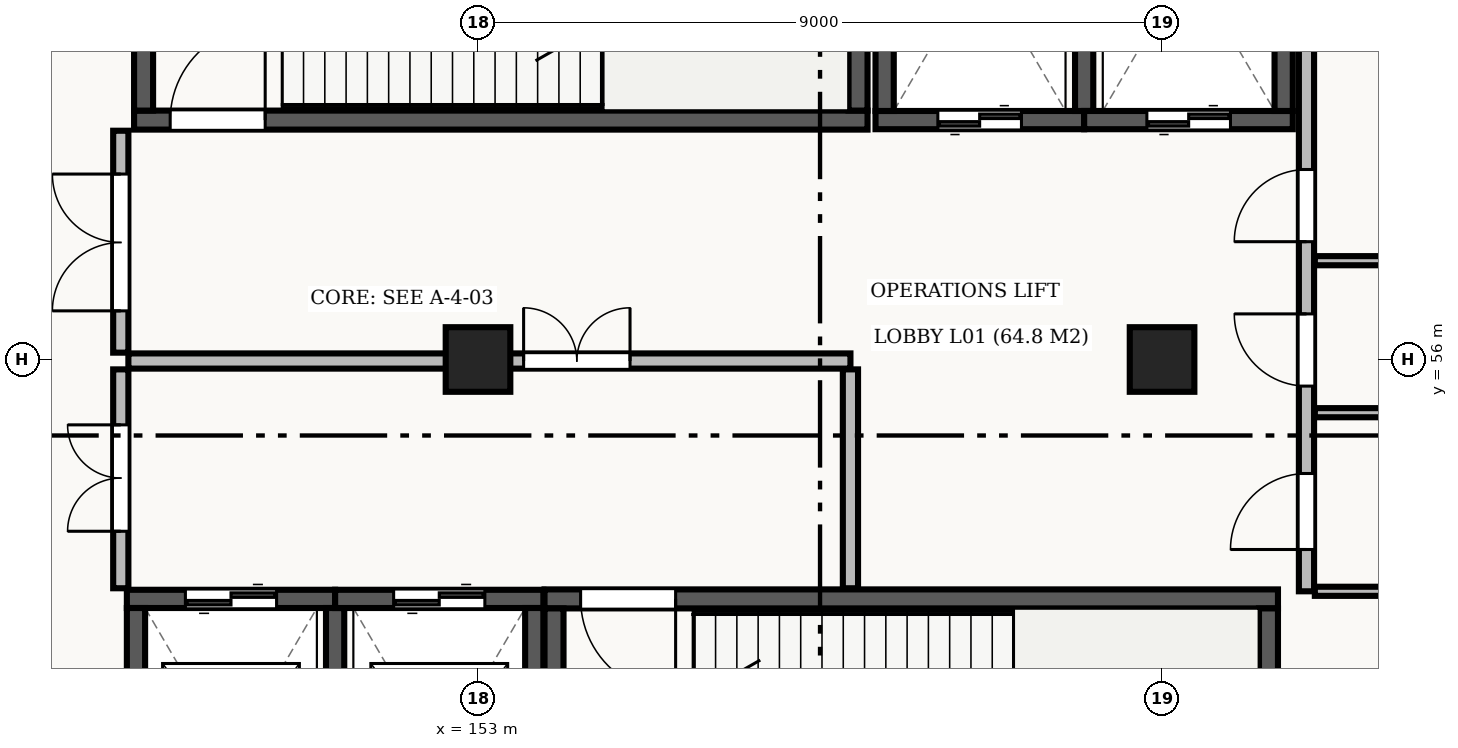
"""IFC4 building model, lengths in metres.
Left out: names, types, materials, properties, quantities, classifications, styles, units other than length and angle.
Written with IfcOpenShell. Run it as: python <this file> out.ifc"""

import sys

from ifc_helpers import new_model, si_unit, direction, frame, frame_2d, origin, origin_2d, place, context, subcontext, project, spatial, rectangle, extrude, element, fill, save


model = new_model("IFC4")
c1 = context("Model", 3, precision=1e-05, world=origin(), true_north=direction((0.0, 1.0)))
c2 = subcontext(c1, "Body", "Model", "MODEL_VIEW")
j1 = project(units=[si_unit("LENGTHUNIT", "METRE"), si_unit("PLANEANGLEUNIT", "RADIAN")], contexts=[c1])
p1 = place(None, origin())
s1 = spatial("IfcSite", under=j1, at=p1, CompositionType="ELEMENT")
p2 = place(p1, origin())
s2 = spatial("IfcBuilding", under=s1, at=p2, CompositionType="ELEMENT")
p3 = place(p2, frame((0.0, 0.0, 5.4)))
s3 = spatial("IfcBuildingStorey", under=s2, at=p3, CompositionType="ELEMENT", Elevation=5.4)
for number, where, z_axis, x_axis in (
    (1, (153.0, 56.0, 0.0), (0.0, 0.0, 1.0), (1.0, 0.0, 0.0)),
    (2, (162.0, 56.0, 0.0), (0.0, 0.0, 1.0), (1.0, 0.0, 0.0)),
):
    element("IfcColumn", number, at=place(p3, frame(where, z_axis=z_axis, x_axis=x_axis)), inside=s3, PredefinedType="COLUMN", context=c2, shape_type="SweptSolid", body=[
        extrude(rectangle(XDim=0.85, YDim=0.85, at=origin_2d()), origin(), (0.0, 0.0, 1.0), 4.8),
    ])
p4 = place(p3, frame((148.475, 59.15, 0.0), z_axis=(0.0, 0.0, 1.0), x_axis=(1.0, 0.0, 0.0)))
e3 = element("IfcWall", 3, at=p4, inside=s3, PredefinedType="SHEAR", context=c2, shape_type="SweptSolid", body=[
    extrude(rectangle(XDim=9.65, YDim=0.25, at=frame_2d((4.825, 0.0))), origin(), (0.0, 0.0, 1.0), 4.48),
])
p5 = place(p4, frame((0.475, 0.0, 0.0)))
e4 = element("IfcOpeningElement", 4, at=p5, cuts=e3, PredefinedType="OPENING", context=c2, shape_type="SweptSolid", body=[
    extrude(rectangle(XDim=1.25, YDim=2.15, at=frame_2d((0.625, 1.075))), frame((0.0, 0.137, 0.0), z_axis=(0.0, -1.0, 0.0), x_axis=(1.0, 0.0, 0.0)), (0.0, 0.0, 1.0), 0.274),
])
for number, where, z_axis, x_axis in (
    (5, (148.6, 63.125, 0.0), (0.0, 0.0, 1.0), (0.0, -1.0, 0.0)),
    (6, (158.0, 59.275, 0.0), (0.0, 0.0, 1.0), (0.0, 1.0, 0.0)),
):
    element("IfcWall", number, at=place(p3, frame(where, z_axis=z_axis, x_axis=x_axis)), inside=s3, PredefinedType="SHEAR", context=c2, shape_type="SweptSolid", body=[
        extrude(rectangle(XDim=3.85, YDim=0.25, at=frame_2d((1.925, 0.0))), origin(), (0.0, 0.0, 1.0), 4.48),
    ])
p6 = place(p3, frame((163.525, 52.85, 0.0), z_axis=(0.0, 0.0, 1.0), x_axis=(-1.0, 0.0, 0.0)))
e7 = element("IfcWall", 7, at=p6, inside=s3, PredefinedType="SHEAR", context=c2, shape_type="SweptSolid", body=[
    extrude(rectangle(XDim=9.65, YDim=0.25, at=frame_2d((4.825, 0.0))), origin(), (0.0, 0.0, 1.0), 4.48),
])
p7 = place(p6, frame((7.925, 0.0, 0.0)))
e8 = element("IfcOpeningElement", 8, at=p7, cuts=e7, PredefinedType="OPENING", context=c2, shape_type="SweptSolid", body=[
    extrude(rectangle(XDim=1.25, YDim=2.15, at=frame_2d((0.625, 1.075))), frame((0.0, 0.137, 0.0), z_axis=(0.0, -1.0, 0.0), x_axis=(1.0, 0.0, 0.0)), (0.0, 0.0, 1.0), 0.274),
])
for number, where, z_axis, x_axis in (
    (9, (154.0, 52.725, 0.0), (0.0, 0.0, 1.0), (0.0, -1.0, 0.0)),
    (10, (163.4, 48.875, 0.0), (0.0, 0.0, 1.0), (0.0, 1.0, 0.0)),
):
    element("IfcWall", number, at=place(p3, frame(where, z_axis=z_axis, x_axis=x_axis)), inside=s3, PredefinedType="SHEAR", context=c2, shape_type="SweptSolid", body=[
        extrude(rectangle(XDim=3.85, YDim=0.25, at=frame_2d((1.925, 0.0))), origin(), (0.0, 0.0, 1.0), 4.48),
    ])
p8 = place(p3, frame((158.23, 59.15, 0.0), z_axis=(0.0, 0.0, 1.0), x_axis=(1.0, 0.0, 0.0)))
e11 = element("IfcWall", 11, at=p8, inside=s3, PredefinedType="SHEAR", context=c2, shape_type="SweptSolid", body=[
    extrude(rectangle(XDim=2.745, YDim=0.24, at=frame_2d((1.373, 0.0))), origin(), (0.0, 0.0, 1.0), 4.48),
])
p9 = place(p8, frame((0.82, 0.0, 0.0)))
e12 = element("IfcOpeningElement", 12, at=p9, cuts=e11, PredefinedType="OPENING", context=c2, shape_type="SweptSolid", body=[
    extrude(rectangle(XDim=1.1, YDim=2.2, at=frame_2d((0.55, 1.1))), frame((0.0, 0.132, 0.0), z_axis=(0.0, -1.0, 0.0), x_axis=(1.0, 0.0, 0.0)), (0.0, 0.0, 1.0), 0.264),
])
for number, where, z_axis, x_axis in (
    (13, (158.35, 63.13, 0.0), (0.0, 0.0, 1.0), (0.0, -1.0, 0.0)),
    (14, (160.975, 59.27, 0.0), (0.0, 0.0, 1.0), (0.0, 1.0, 0.0)),
):
    element("IfcWall", number, at=place(p3, frame(where, z_axis=z_axis, x_axis=x_axis)), inside=s3, PredefinedType="SHEAR", context=c2, shape_type="SweptSolid", body=[
        extrude(rectangle(XDim=3.86, YDim=0.24, at=frame_2d((1.93, 0.0))), origin(), (0.0, 0.0, 1.0), 4.48),
    ])
p10 = place(p3, frame((160.975, 59.15, 0.0), z_axis=(0.0, 0.0, 1.0), x_axis=(1.0, 0.0, 0.0)))
e15 = element("IfcWall", 15, at=p10, inside=s3, PredefinedType="SHEAR", context=c2, shape_type="SweptSolid", body=[
    extrude(rectangle(XDim=2.745, YDim=0.24, at=frame_2d((1.373, 0.0))), origin(), (0.0, 0.0, 1.0), 4.48),
])
p11 = place(p10, frame((0.825, 0.0, 0.0)))
e16 = element("IfcOpeningElement", 16, at=p11, cuts=e15, PredefinedType="OPENING", context=c2, shape_type="SweptSolid", body=[
    extrude(rectangle(XDim=1.1, YDim=2.2, at=frame_2d((0.55, 1.1))), frame((0.0, 0.132, 0.0), z_axis=(0.0, -1.0, 0.0), x_axis=(1.0, 0.0, 0.0)), (0.0, 0.0, 1.0), 0.264),
])
p12 = place(p3, frame((163.6, 59.27, 0.0), z_axis=(0.0, 0.0, 1.0), x_axis=(0.0, 1.0, 0.0)))
e17 = element("IfcWall", 17, at=p12, inside=s3, PredefinedType="SHEAR", context=c2, shape_type="SweptSolid", body=[
    extrude(rectangle(XDim=3.86, YDim=0.24, at=frame_2d((1.93, 0.0))), origin(), (0.0, 0.0, 1.0), 4.48),
])
p13 = place(p3, frame((151.12, 52.85, 0.0), z_axis=(0.0, 0.0, 1.0), x_axis=(-1.0, 0.0, 0.0)))
e18 = element("IfcWall", 18, at=p13, inside=s3, PredefinedType="SHEAR", context=c2, shape_type="SweptSolid", body=[
    extrude(rectangle(XDim=2.74, YDim=0.24, at=frame_2d((1.37, 0.0))), origin(), (0.0, 0.0, 1.0), 4.48),
])
p14 = place(p13, frame((0.77, 0.0, 0.0)))
e19 = element("IfcOpeningElement", 19, at=p14, cuts=e18, PredefinedType="OPENING", context=c2, shape_type="SweptSolid", body=[
    extrude(rectangle(XDim=1.2, YDim=2.2, at=frame_2d((0.6, 1.1))), frame((0.0, 0.132, 0.0), z_axis=(0.0, -1.0, 0.0), x_axis=(1.0, 0.0, 0.0)), (0.0, 0.0, 1.0), 0.264),
])
for number, where, z_axis, x_axis in (
    (20, (148.5, 52.73, 0.0), (0.0, 0.0, 1.0), (0.0, -1.0, 0.0)),
    (21, (151.12, 48.87, 0.0), (0.0, 0.0, 1.0), (0.0, 1.0, 0.0)),
):
    element("IfcWall", number, at=place(p3, frame(where, z_axis=z_axis, x_axis=x_axis)), inside=s3, PredefinedType="SHEAR", context=c2, shape_type="SweptSolid", body=[
        extrude(rectangle(XDim=3.86, YDim=0.24, at=frame_2d((1.93, 0.0))), origin(), (0.0, 0.0, 1.0), 4.48),
    ])
p15 = place(p3, frame((153.86, 52.85, 0.0), z_axis=(0.0, 0.0, 1.0), x_axis=(-1.0, 0.0, 0.0)))
e22 = element("IfcWall", 22, at=p15, inside=s3, PredefinedType="SHEAR", context=c2, shape_type="SweptSolid", body=[
    extrude(rectangle(XDim=2.74, YDim=0.24, at=frame_2d((1.37, 0.0))), origin(), (0.0, 0.0, 1.0), 4.48),
])
p16 = place(p15, frame((0.77, 0.0, 0.0)))
e23 = element("IfcOpeningElement", 23, at=p16, cuts=e22, PredefinedType="OPENING", context=c2, shape_type="SweptSolid", body=[
    extrude(rectangle(XDim=1.2, YDim=2.2, at=frame_2d((0.6, 1.1))), frame((0.0, 0.132, 0.0), z_axis=(0.0, -1.0, 0.0), x_axis=(1.0, 0.0, 0.0)), (0.0, 0.0, 1.0), 0.264),
])
p17 = place(p3, frame((153.74, 48.87, 0.0), z_axis=(0.0, 0.0, 1.0), x_axis=(0.0, 1.0, 0.0)))
e24 = element("IfcWall", 24, at=p17, inside=s3, PredefinedType="SHEAR", context=c2, shape_type="SweptSolid", body=[
    extrude(rectangle(XDim=3.86, YDim=0.24, at=frame_2d((1.93, 0.0))), origin(), (0.0, 0.0, 1.0), 4.48),
])
p18 = place(p3, frame((148.4, 55.98, 0.0), z_axis=(0.0, 0.0, 1.0), x_axis=(1.0, 0.0, 0.0)))
e25 = element("IfcWall", 25, at=p18, inside=s3, PredefinedType="STANDARD", context=c2, shape_type="SweptSolid", body=[
    extrude(rectangle(XDim=9.5, YDim=0.2, at=frame_2d((4.75, 0.0))), origin(), (0.0, 0.0, 1.0), 3.76),
])
p19 = place(p18, frame((5.2, 0.0, 0.0)))
e26 = element("IfcOpeningElement", 26, at=p19, cuts=e25, PredefinedType="OPENING", context=c2, shape_type="SweptSolid", body=[
    extrude(rectangle(XDim=1.4, YDim=2.2, at=frame_2d((0.7, 1.1))), frame((0.0, 0.112, 0.0), z_axis=(0.0, -1.0, 0.0), x_axis=(1.0, 0.0, 0.0)), (0.0, 0.0, 1.0), 0.224),
])
p20 = place(p3, frame((157.9, 52.99, 0.0), z_axis=(0.0, 0.0, 1.0), x_axis=(0.0, 1.0, 0.0)))
e27 = element("IfcWall", 27, at=p20, inside=s3, PredefinedType="STANDARD", context=c2, shape_type="SweptSolid", body=[
    extrude(rectangle(XDim=2.88, YDim=0.2, at=frame_2d((1.44, 0.0))), origin(), (0.0, 0.0, 1.0), 4.48),
])
p21 = place(p3, frame((148.3, 52.99, 0.0), z_axis=(0.0, 0.0, 1.0), x_axis=(0.0, 1.0, 0.0)))
e28 = element("IfcWall", 28, at=p21, inside=s3, PredefinedType="STANDARD", context=c2, shape_type="SweptSolid", body=[
    extrude(rectangle(XDim=2.88, YDim=0.2, at=frame_2d((1.44, 0.0))), origin(), (0.0, 0.0, 1.0), 4.48),
])
p22 = place(p21, frame((0.75, 0.0, 0.0)))
e29 = element("IfcOpeningElement", 29, at=p22, cuts=e28, PredefinedType="OPENING", context=c2, shape_type="SweptSolid", body=[
    extrude(rectangle(XDim=1.4, YDim=2.2, at=frame_2d((0.7, 1.1))), frame((0.0, 0.112, 0.0), z_axis=(0.0, -1.0, 0.0), x_axis=(1.0, 0.0, 0.0)), (0.0, 0.0, 1.0), 0.224),
])
p23 = place(p3, frame((148.3, 56.09, 0.0), z_axis=(0.0, 0.0, 1.0), x_axis=(0.0, 1.0, 0.0)))
e30 = element("IfcWall", 30, at=p23, inside=s3, PredefinedType="STANDARD", context=c2, shape_type="SweptSolid", body=[
    extrude(rectangle(XDim=2.92, YDim=0.2, at=frame_2d((1.46, 0.0))), origin(), (0.0, 0.0, 1.0), 4.48),
])
p24 = place(p23, frame((0.55, 0.0, 0.0)))
e31 = element("IfcOpeningElement", 31, at=p24, cuts=e30, PredefinedType="OPENING", context=c2, shape_type="SweptSolid", body=[
    extrude(rectangle(XDim=1.8, YDim=2.2, at=frame_2d((0.9, 1.1))), frame((0.0, 0.112, 0.0), z_axis=(0.0, -1.0, 0.0), x_axis=(1.0, 0.0, 0.0)), (0.0, 0.0, 1.0), 0.224),
])
p25 = place(p3, frame((163.9, 52.95, 0.0), z_axis=(0.0, 0.0, 1.0), x_axis=(0.0, 1.0, 0.0)))
e32 = element("IfcWall", 32, at=p25, inside=s3, PredefinedType="STANDARD", context=c2, shape_type="SweptSolid", body=[
    extrude(rectangle(XDim=10.3, YDim=0.2, at=frame_2d((5.15, 0.0))), origin(), (0.0, 0.0, 1.0), 4.48),
])
p26 = place(p25, frame((0.55, 0.0, 0.0)))
e33 = element("IfcOpeningElement", 33, at=p26, cuts=e32, PredefinedType="OPENING", context=c2, shape_type="SweptSolid", body=[
    extrude(rectangle(XDim=1.0, YDim=2.1, at=frame_2d((0.5, 1.05))), frame((0.0, 0.112, 0.0), z_axis=(0.0, -1.0, 0.0), x_axis=(1.0, 0.0, 0.0)), (0.0, 0.0, 1.0), 0.224),
])
p27 = place(p25, frame((2.7, 0.0, 0.0)))
e34 = element("IfcOpeningElement", 34, at=p27, cuts=e32, PredefinedType="OPENING", context=c2, shape_type="SweptSolid", body=[
    extrude(rectangle(XDim=0.95, YDim=2.1, at=frame_2d((0.475, 1.05))), frame((0.0, 0.112, 0.0), z_axis=(0.0, -1.0, 0.0), x_axis=(1.0, 0.0, 0.0)), (0.0, 0.0, 1.0), 0.224),
])
p28 = place(p25, frame((4.6, 0.0, 0.0)))
e35 = element("IfcOpeningElement", 35, at=p28, cuts=e32, PredefinedType="OPENING", context=c2, shape_type="SweptSolid", body=[
    extrude(rectangle(XDim=0.95, YDim=2.1, at=frame_2d((0.475, 1.05))), frame((0.0, 0.112, 0.0), z_axis=(0.0, -1.0, 0.0), x_axis=(1.0, 0.0, 0.0)), (0.0, 0.0, 1.0), 0.224),
])
for number, where, z_axis, x_axis in (
    (36, (164.01, 52.95, 0.0), (0.0, 0.0, 1.0), (1.0, 0.0, 0.0)),
    (37, (164.01, 55.3, 0.0), (0.0, 0.0, 1.0), (1.0, 0.0, 0.0)),
    (38, (164.01, 57.3, 0.0), (0.0, 0.0, 1.0), (1.0, 0.0, 0.0)),
):
    element("IfcWall", number, at=place(p3, frame(where, z_axis=z_axis, x_axis=x_axis)), inside=s3, PredefinedType="STANDARD", context=c2, shape_type="SweptSolid", body=[
        extrude(rectangle(XDim=6.815, YDim=0.12, at=frame_2d((3.407, 0.0))), origin(), (0.0, 0.0, 1.0), 4.48),
    ])
p29 = place(p5, origin())
e39 = element("IfcDoor", 39, at=p29, inside=s3, OperationType="SINGLE_SWING_RIGHT", PredefinedType="DOOR", context=c2, shape_type="SweptSolid", body=[
    extrude(rectangle(XDim=1.25, YDim=2.15, at=frame_2d((0.625, 1.075))), frame((0.0, 0.025, 0.0), z_axis=(0.0, -1.0, 0.0), x_axis=(1.0, 0.0, 0.0)), (0.0, 0.0, 1.0), 0.05),
])
fill(e4, e39)
p30 = place(p7, origin())
e40 = element("IfcDoor", 40, at=p30, inside=s3, OperationType="SINGLE_SWING_LEFT", PredefinedType="DOOR", context=c2, shape_type="SweptSolid", body=[
    extrude(rectangle(XDim=1.25, YDim=2.15, at=frame_2d((0.625, 1.075))), frame((0.0, 0.025, 0.0), z_axis=(0.0, -1.0, 0.0), x_axis=(1.0, 0.0, 0.0)), (0.0, 0.0, 1.0), 0.05),
])
fill(e8, e40)
p31 = place(p9, origin())
e41 = element("IfcDoor", 41, at=p31, inside=s3, OperationType="DOUBLE_DOOR_SLIDING", PredefinedType="DOOR", context=c2, shape_type="SweptSolid", body=[
    extrude(rectangle(XDim=1.1, YDim=2.2, at=frame_2d((0.55, 1.1))), frame((0.0, 0.025, 0.0), z_axis=(0.0, -1.0, 0.0), x_axis=(1.0, 0.0, 0.0)), (0.0, 0.0, 1.0), 0.05),
])
fill(e12, e41)
p32 = place(p11, origin())
e42 = element("IfcDoor", 42, at=p32, inside=s3, OperationType="DOUBLE_DOOR_SLIDING", PredefinedType="DOOR", context=c2, shape_type="SweptSolid", body=[
    extrude(rectangle(XDim=1.1, YDim=2.2, at=frame_2d((0.55, 1.1))), frame((0.0, 0.025, 0.0), z_axis=(0.0, -1.0, 0.0), x_axis=(1.0, 0.0, 0.0)), (0.0, 0.0, 1.0), 0.05),
])
fill(e16, e42)
p33 = place(p14, origin())
e43 = element("IfcDoor", 43, at=p33, inside=s3, OperationType="DOUBLE_DOOR_SLIDING", PredefinedType="DOOR", context=c2, shape_type="SweptSolid", body=[
    extrude(rectangle(XDim=1.2, YDim=2.2, at=frame_2d((0.6, 1.1))), frame((0.0, 0.025, 0.0), z_axis=(0.0, -1.0, 0.0), x_axis=(1.0, 0.0, 0.0)), (0.0, 0.0, 1.0), 0.05),
])
fill(e19, e43)
p34 = place(p16, origin())
e44 = element("IfcDoor", 44, at=p34, inside=s3, OperationType="DOUBLE_DOOR_SLIDING", PredefinedType="DOOR", context=c2, shape_type="SweptSolid", body=[
    extrude(rectangle(XDim=1.2, YDim=2.2, at=frame_2d((0.6, 1.1))), frame((0.0, 0.025, 0.0), z_axis=(0.0, -1.0, 0.0), x_axis=(1.0, 0.0, 0.0)), (0.0, 0.0, 1.0), 0.05),
])
fill(e23, e44)
p35 = place(p19, origin())
e45 = element("IfcDoor", 45, at=p35, inside=s3, OperationType="DOUBLE_DOOR_SINGLE_SWING", PredefinedType="DOOR", context=c2, shape_type="SweptSolid", body=[
    extrude(rectangle(XDim=1.4, YDim=2.2, at=frame_2d((0.7, 1.1))), frame((0.0, 0.025, 0.0), z_axis=(0.0, -1.0, 0.0), x_axis=(1.0, 0.0, 0.0)), (0.0, 0.0, 1.0), 0.05),
])
fill(e26, e45)
p36 = place(p22, origin())
e46 = element("IfcDoor", 46, at=p36, inside=s3, OperationType="DOUBLE_DOOR_SINGLE_SWING", PredefinedType="DOOR", context=c2, shape_type="SweptSolid", body=[
    extrude(rectangle(XDim=1.4, YDim=2.2, at=frame_2d((0.7, 1.1))), frame((0.0, 0.025, 0.0), z_axis=(0.0, -1.0, 0.0), x_axis=(1.0, 0.0, 0.0)), (0.0, 0.0, 1.0), 0.05),
])
fill(e29, e46)
p37 = place(p24, origin())
e47 = element("IfcDoor", 47, at=p37, inside=s3, OperationType="DOUBLE_DOOR_SINGLE_SWING", PredefinedType="DOOR", context=c2, shape_type="SweptSolid", body=[
    extrude(rectangle(XDim=1.8, YDim=2.2, at=frame_2d((0.9, 1.1))), frame((0.0, 0.025, 0.0), z_axis=(0.0, -1.0, 0.0), x_axis=(1.0, 0.0, 0.0)), (0.0, 0.0, 1.0), 0.05),
])
fill(e31, e47)
p38 = place(p26, origin())
e48 = element("IfcDoor", 48, at=p38, inside=s3, OperationType="SINGLE_SWING_LEFT", PredefinedType="DOOR", context=c2, shape_type="SweptSolid", body=[
    extrude(rectangle(XDim=1.0, YDim=2.1, at=frame_2d((0.5, 1.05))), frame((0.0, 0.025, 0.0), z_axis=(0.0, -1.0, 0.0), x_axis=(1.0, 0.0, 0.0)), (0.0, 0.0, 1.0), 0.05),
])
fill(e33, e48)
p39 = place(p27, origin())
e49 = element("IfcDoor", 49, at=p39, inside=s3, OperationType="SINGLE_SWING_RIGHT", PredefinedType="DOOR", context=c2, shape_type="SweptSolid", body=[
    extrude(rectangle(XDim=0.95, YDim=2.1, at=frame_2d((0.475, 1.05))), frame((0.0, 0.025, 0.0), z_axis=(0.0, -1.0, 0.0), x_axis=(1.0, 0.0, 0.0)), (0.0, 0.0, 1.0), 0.05),
])
fill(e34, e49)
p40 = place(p28, origin())
e50 = element("IfcDoor", 50, at=p40, inside=s3, OperationType="SINGLE_SWING_LEFT", PredefinedType="DOOR", context=c2, shape_type="SweptSolid", body=[
    extrude(rectangle(XDim=0.95, YDim=2.1, at=frame_2d((0.475, 1.05))), frame((0.0, 0.025, 0.0), z_axis=(0.0, -1.0, 0.0), x_axis=(1.0, 0.0, 0.0)), (0.0, 0.0, 1.0), 0.05),
])
fill(e35, e50)
save(model, sys.argv[1])
